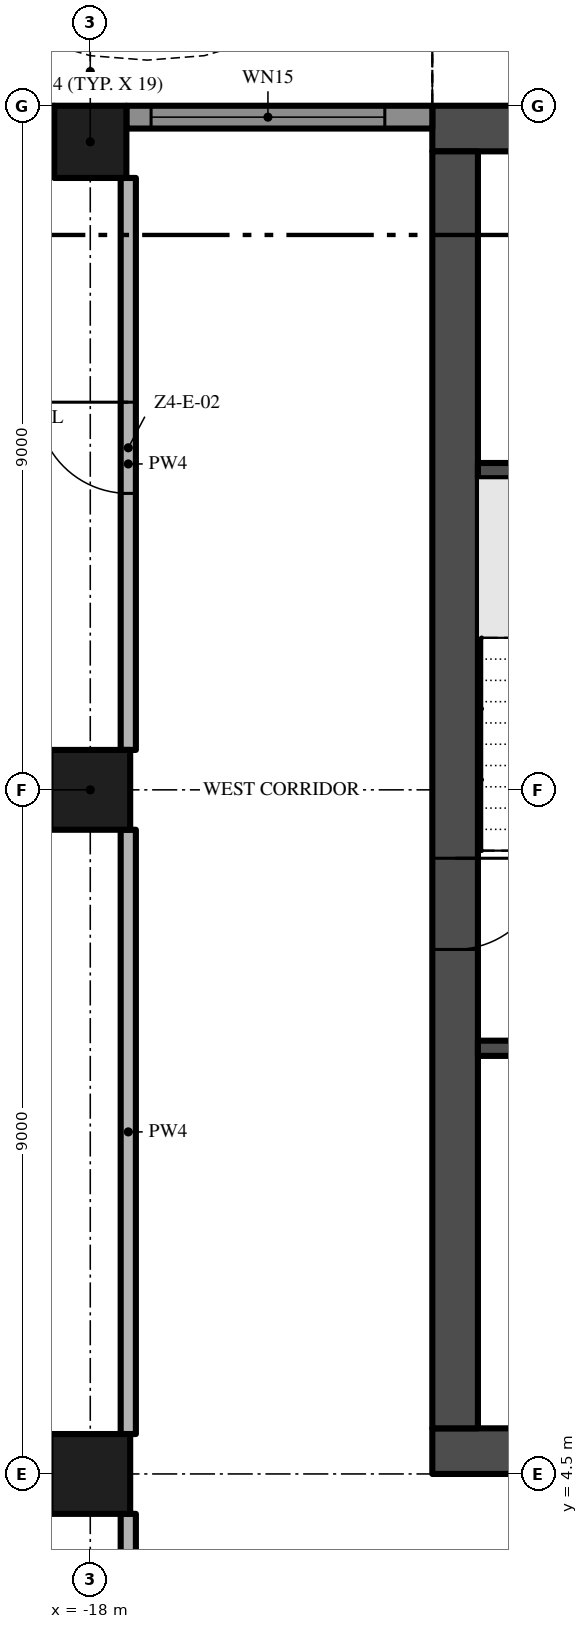
"""IFC4 building model, lengths in metres.
Left out: names, types, materials, properties, quantities, classifications, styles, units other than length and angle.
Written with IfcOpenShell. Run it as: python <this file> out.ifc"""

import sys

from ifc_helpers import new_model, si_unit, direction, frame, frame_2d, origin, origin_2d, place, context, subcontext, project, spatial, polyline, rectangle, outline, extrude, element, fill, save


model = new_model("IFC4")
c1 = context("Model", 3, precision=1e-05, world=origin(), true_north=direction((0.0, 1.0)))
c2 = subcontext(c1, "Body", "Model", "MODEL_VIEW")
j1 = project(units=[si_unit("LENGTHUNIT", "METRE"), si_unit("PLANEANGLEUNIT", "RADIAN")], contexts=[c1])
p1 = place(None, origin())
s1 = spatial("IfcSite", under=j1, at=p1, CompositionType="ELEMENT")
p2 = place(p1, origin())
s2 = spatial("IfcBuilding", under=s1, at=p2, CompositionType="ELEMENT")
p3 = place(p2, frame((0.0, 0.0, 226.2)))
s3 = spatial("IfcBuildingStorey", under=s2, at=p3, CompositionType="ELEMENT", Elevation=226.2)
p4 = place(p3, frame((-13.5, 4.8, -0.3), z_axis=(0.0, 0.0, 1.0), x_axis=(1.0, 0.0, 0.0)))
e1 = element("IfcWall", 1, at=p4, inside=s3, PredefinedType="SHEAR", context=c2, shape_type="SweptSolid", body=[
    extrude(rectangle(XDim=27.0, YDim=0.6, at=frame_2d((13.5, 0.0))), origin(), (0.0, 0.0, 1.0), 3.8),
])
p5 = place(p4, frame((12.0, 0.0, 0.3)))
e2 = element("IfcOpeningElement", 2, at=p5, cuts=e1, PredefinedType="OPENING", context=c2, shape_type="SweptSolid", body=[
    extrude(rectangle(XDim=3.0, YDim=2.4, at=frame_2d((1.5, 1.2))), frame((0.0, 0.31, 0.0), z_axis=(0.0, -1.0, 0.0), x_axis=(1.0, 0.0, 0.0)), (0.0, 0.0, 1.0), 0.62),
])
p6 = place(p4, frame((4.9, 0.0, 0.3)))
e3 = element("IfcOpeningElement", 3, at=p6, cuts=e1, PredefinedType="OPENING", context=c2, shape_type="SweptSolid", body=[
    extrude(rectangle(XDim=1.2, YDim=2.2, at=frame_2d((0.6, 1.1))), frame((0.0, 0.31, 0.0), z_axis=(0.0, -1.0, 0.0), x_axis=(1.0, 0.0, 0.0)), (0.0, 0.0, 1.0), 0.62),
])
p7 = place(p4, frame((20.75, 0.0, 0.3)))
e4 = element("IfcOpeningElement", 4, at=p7, cuts=e1, PredefinedType="OPENING", context=c2, shape_type="SweptSolid", body=[
    extrude(rectangle(XDim=1.5, YDim=2.2, at=frame_2d((0.75, 1.1))), frame((0.0, 0.31, 0.0), z_axis=(0.0, -1.0, 0.0), x_axis=(1.0, 0.0, 0.0)), (0.0, 0.0, 1.0), 0.62),
])
p8 = place(p4, frame((17.4, 0.0, 0.3)))
e5 = element("IfcOpeningElement", 5, at=p8, cuts=e1, PredefinedType="OPENING", context=c2, shape_type="SweptSolid", body=[
    extrude(rectangle(XDim=1.2, YDim=2.2, at=frame_2d((0.6, 1.1))), frame((0.0, 0.31, 0.0), z_axis=(0.0, -1.0, 0.0), x_axis=(1.0, 0.0, 0.0)), (0.0, 0.0, 1.0), 0.62),
])
p9 = place(p3, frame((13.5, 22.2, -0.3), z_axis=(0.0, 0.0, 1.0), x_axis=(-1.0, 0.0, 0.0)))
e6 = element("IfcWall", 6, at=p9, inside=s3, PredefinedType="SHEAR", context=c2, shape_type="SweptSolid", body=[
    extrude(rectangle(XDim=27.0, YDim=0.6, at=frame_2d((13.5, 0.0))), origin(), (0.0, 0.0, 1.0), 3.8),
])
p10 = place(p3, frame((-13.2, 21.9, -0.3), z_axis=(0.0, 0.0, 1.0), x_axis=(0.0, -1.0, 0.0)))
e7 = element("IfcWall", 7, at=p10, inside=s3, PredefinedType="SHEAR", context=c2, shape_type="SweptSolid", body=[
    extrude(rectangle(XDim=16.8, YDim=0.6, at=frame_2d((8.4, 0.0))), origin(), (0.0, 0.0, 1.0), 3.8),
])
p11 = place(p10, frame((9.3, 0.0, 0.3)))
e8 = element("IfcOpeningElement", 8, at=p11, cuts=e7, PredefinedType="OPENING", context=c2, shape_type="SweptSolid", body=[
    extrude(rectangle(XDim=1.2, YDim=2.2, at=frame_2d((0.6, 1.1))), frame((0.0, 0.31, 0.0), z_axis=(0.0, -1.0, 0.0), x_axis=(1.0, 0.0, 0.0)), (0.0, 0.0, 1.0), 0.62),
])
p12 = place(p3, frame((-18.0, 13.5, 0.0), z_axis=(0.0, 0.0, 1.0), x_axis=(1.0, 0.0, 0.0)))
e9 = element("IfcColumn", 9, at=p12, inside=s3, PredefinedType="COLUMN", context=c2, shape_type="SweptSolid", body=[
    extrude(rectangle(XDim=1.05, YDim=1.05, at=origin_2d()), origin(), (0.0, 0.0, 1.0), 3.5),
])
p13 = place(p3, frame((-18.0, 22.025, 0.0), z_axis=(0.0, 0.0, 1.0), x_axis=(1.0, 0.0, 0.0)))
e10 = element("IfcColumn", 10, at=p13, inside=s3, PredefinedType="COLUMN", context=c2, shape_type="SweptSolid", body=[
    extrude(rectangle(XDim=0.95, YDim=0.95, at=origin_2d()), origin(), (0.0, 0.0, 1.0), 3.5),
])
p14 = place(p3, frame((-18.0, 4.5, 0.0), z_axis=(0.0, 0.0, 1.0), x_axis=(1.0, 0.0, 0.0)))
e11 = element("IfcColumn", 11, at=p14, inside=s3, PredefinedType="COLUMN", context=c2, shape_type="SweptSolid", body=[
    extrude(rectangle(XDim=1.05, YDim=1.05, at=origin_2d()), origin(), (0.0, 0.0, 1.0), 3.5),
])
p15 = place(p3, frame((-17.525, 22.35, 0.0), z_axis=(0.0, 0.0, 1.0), x_axis=(1.0, 0.0, 0.0)))
e12 = element("IfcWall", 12, at=p15, inside=s3, PredefinedType="SOLIDWALL", context=c2, shape_type="SweptSolid", body=[
    extrude(rectangle(XDim=4.025, YDim=0.3, at=frame_2d((2.013, 0.0))), origin(), (0.0, 0.0, 1.0), 3.5),
])
p16 = place(p15, frame((0.325, 0.0, 0.45)))
e13 = element("IfcOpeningElement", 13, at=p16, cuts=e12, PredefinedType="OPENING", context=c2, shape_type="SweptSolid", body=[
    extrude(rectangle(XDim=3.075, YDim=2.65, at=frame_2d((1.538, 1.325))), frame((0.0, 0.16, 0.0), z_axis=(0.0, -1.0, 0.0), x_axis=(1.0, 0.0, 0.0)), (0.0, 0.0, 1.0), 0.32),
])
p17 = place(p3, frame((-22.5, 22.35, 0.0), z_axis=(0.0, 0.0, 1.0), x_axis=(1.0, 0.0, 0.0)))
e14 = element("IfcWall", 14, at=p17, inside=s3, PredefinedType="SOLIDWALL", context=c2, shape_type="SweptSolid", body=[
    extrude(rectangle(XDim=4.025, YDim=0.3, at=frame_2d((2.013, 0.0))), origin(), (0.0, 0.0, 1.0), 3.5),
])
p18 = place(p17, frame((0.625, 0.0, 0.0)))
e15 = element("IfcOpeningElement", 15, at=p18, cuts=e14, PredefinedType="OPENING", context=c2, shape_type="SweptSolid", body=[
    extrude(rectangle(XDim=2.4, YDim=2.4, at=frame_2d((1.2, 1.2))), frame((0.0, 0.16, 0.0), z_axis=(0.0, -1.0, 0.0), x_axis=(1.0, 0.0, 0.0)), (0.0, 0.0, 1.0), 0.32),
])
p19 = place(p3, origin())
e16 = element("IfcWall", 16, at=p19, inside=s3, PredefinedType="USERDEFINED", context=c2, shape_type="SweptSolid", body=[
    extrude(outline(polyline([(-13.5, 24.3), (-15.0, 23.595), (-16.5, 23.159), (-17.25, 23.1), (-18.0, 23.159), (-19.5, 23.595), (-21.0, 24.3), (-22.5, 25.005), (-22.606, 24.779), (-21.106, 24.074), (-19.589, 23.36), (-18.045, 22.911), (-17.25, 22.849), (-16.455, 22.911), (-14.911, 23.36), (-13.394, 24.074), (-13.5, 24.3)])), origin(), (0.0, 0.0, 1.0), 0.9),
])
for number, where, z_axis, x_axis in (
    (17, (-12.9, 10.1, 0.0), (0.0, 0.0, 1.0), (1.0, 0.0, 0.0)),
    (18, (-12.9, 17.7, 0.0), (0.0, 0.0, 1.0), (1.0, 0.0, 0.0)),
):
    element("IfcWall", number, at=place(p3, frame(where, z_axis=z_axis, x_axis=x_axis)), inside=s3, PredefinedType="SHEAR", context=c2, shape_type="SweptSolid", body=[
        extrude(rectangle(XDim=3.25, YDim=0.2, at=frame_2d((1.625, 0.0))), origin(), (0.0, 0.0, 1.0), 3.5),
    ])
p20 = place(p3, frame((-17.5, -0.2, 0.0), z_axis=(0.0, 0.0, 1.0), x_axis=(0.0, 1.0, 0.0)))
e19 = element("IfcWall", 19, at=p20, inside=s3, PredefinedType="PARTITIONING", context=c2, shape_type="SweptSolid", body=[
    extrude(rectangle(XDim=4.175, YDim=0.2, at=frame_2d((2.087, 0.0))), origin(), (0.0, 0.0, 1.0), 3.5),
])
p21 = place(p3, frame((-17.5, 5.025, 0.0), z_axis=(0.0, 0.0, 1.0), x_axis=(0.0, 1.0, 0.0)))
e20 = element("IfcWall", 20, at=p21, inside=s3, PredefinedType="PARTITIONING", context=c2, shape_type="SweptSolid", body=[
    extrude(rectangle(XDim=7.95, YDim=0.2, at=frame_2d((3.975, 0.0))), origin(), (0.0, 0.0, 1.0), 3.5),
])
p22 = place(p3, frame((-17.5, 14.025, 0.0), z_axis=(0.0, 0.0, 1.0), x_axis=(0.0, 1.0, 0.0)))
e21 = element("IfcWall", 21, at=p22, inside=s3, PredefinedType="PARTITIONING", context=c2, shape_type="SweptSolid", body=[
    extrude(rectangle(XDim=7.525, YDim=0.2, at=frame_2d((3.763, 0.0))), origin(), (0.0, 0.0, 1.0), 3.5),
])
p23 = place(p22, frame((3.375, 0.0, 0.0)))
e22 = element("IfcOpeningElement", 22, at=p23, cuts=e21, PredefinedType="OPENING", context=c2, shape_type="SweptSolid", body=[
    extrude(rectangle(XDim=1.2, YDim=2.4, at=frame_2d((0.6, 1.2))), frame((0.0, 0.11, 0.0), z_axis=(0.0, -1.0, 0.0), x_axis=(1.0, 0.0, 0.0)), (0.0, 0.0, 1.0), 0.22),
])
p24 = place(p16, origin())
e23 = element("IfcWindow", 23, at=p24, inside=s3, PartitioningType="SINGLE_PANEL", PredefinedType="WINDOW", context=c2, shape_type="SweptSolid", body=[
    extrude(rectangle(XDim=3.075, YDim=2.65, at=frame_2d((1.538, 1.325))), frame((0.0, 0.03, 0.0), z_axis=(0.0, -1.0, 0.0), x_axis=(1.0, 0.0, 0.0)), (0.0, 0.0, 1.0), 0.06),
])
fill(e13, e23)
p25 = place(p11, frame((1.2, 0.0, 0.0), z_axis=(0.0, 0.0, 1.0), x_axis=(-1.0, 0.0, 0.0)))
e24 = element("IfcDoor", 24, at=p25, inside=s3, OperationType="SINGLE_SWING_RIGHT", PredefinedType="DOOR", context=c2, shape_type="SweptSolid", body=[
    extrude(rectangle(XDim=1.2, YDim=2.2, at=frame_2d((0.6, 1.1))), frame((0.0, 0.025, 0.0), z_axis=(0.0, -1.0, 0.0), x_axis=(1.0, 0.0, 0.0)), (0.0, 0.0, 1.0), 0.05),
])
fill(e8, e24)
p26 = place(p23, origin())
e25 = element("IfcDoor", 25, at=p26, inside=s3, OperationType="SINGLE_SWING_RIGHT", PredefinedType="DOOR", context=c2, shape_type="SweptSolid", body=[
    extrude(rectangle(XDim=1.2, YDim=2.4, at=frame_2d((0.6, 1.2))), frame((0.0, 0.025, 0.0), z_axis=(0.0, -1.0, 0.0), x_axis=(1.0, 0.0, 0.0)), (0.0, 0.0, 1.0), 0.05),
])
fill(e22, e25)
save(model, sys.argv[1])
